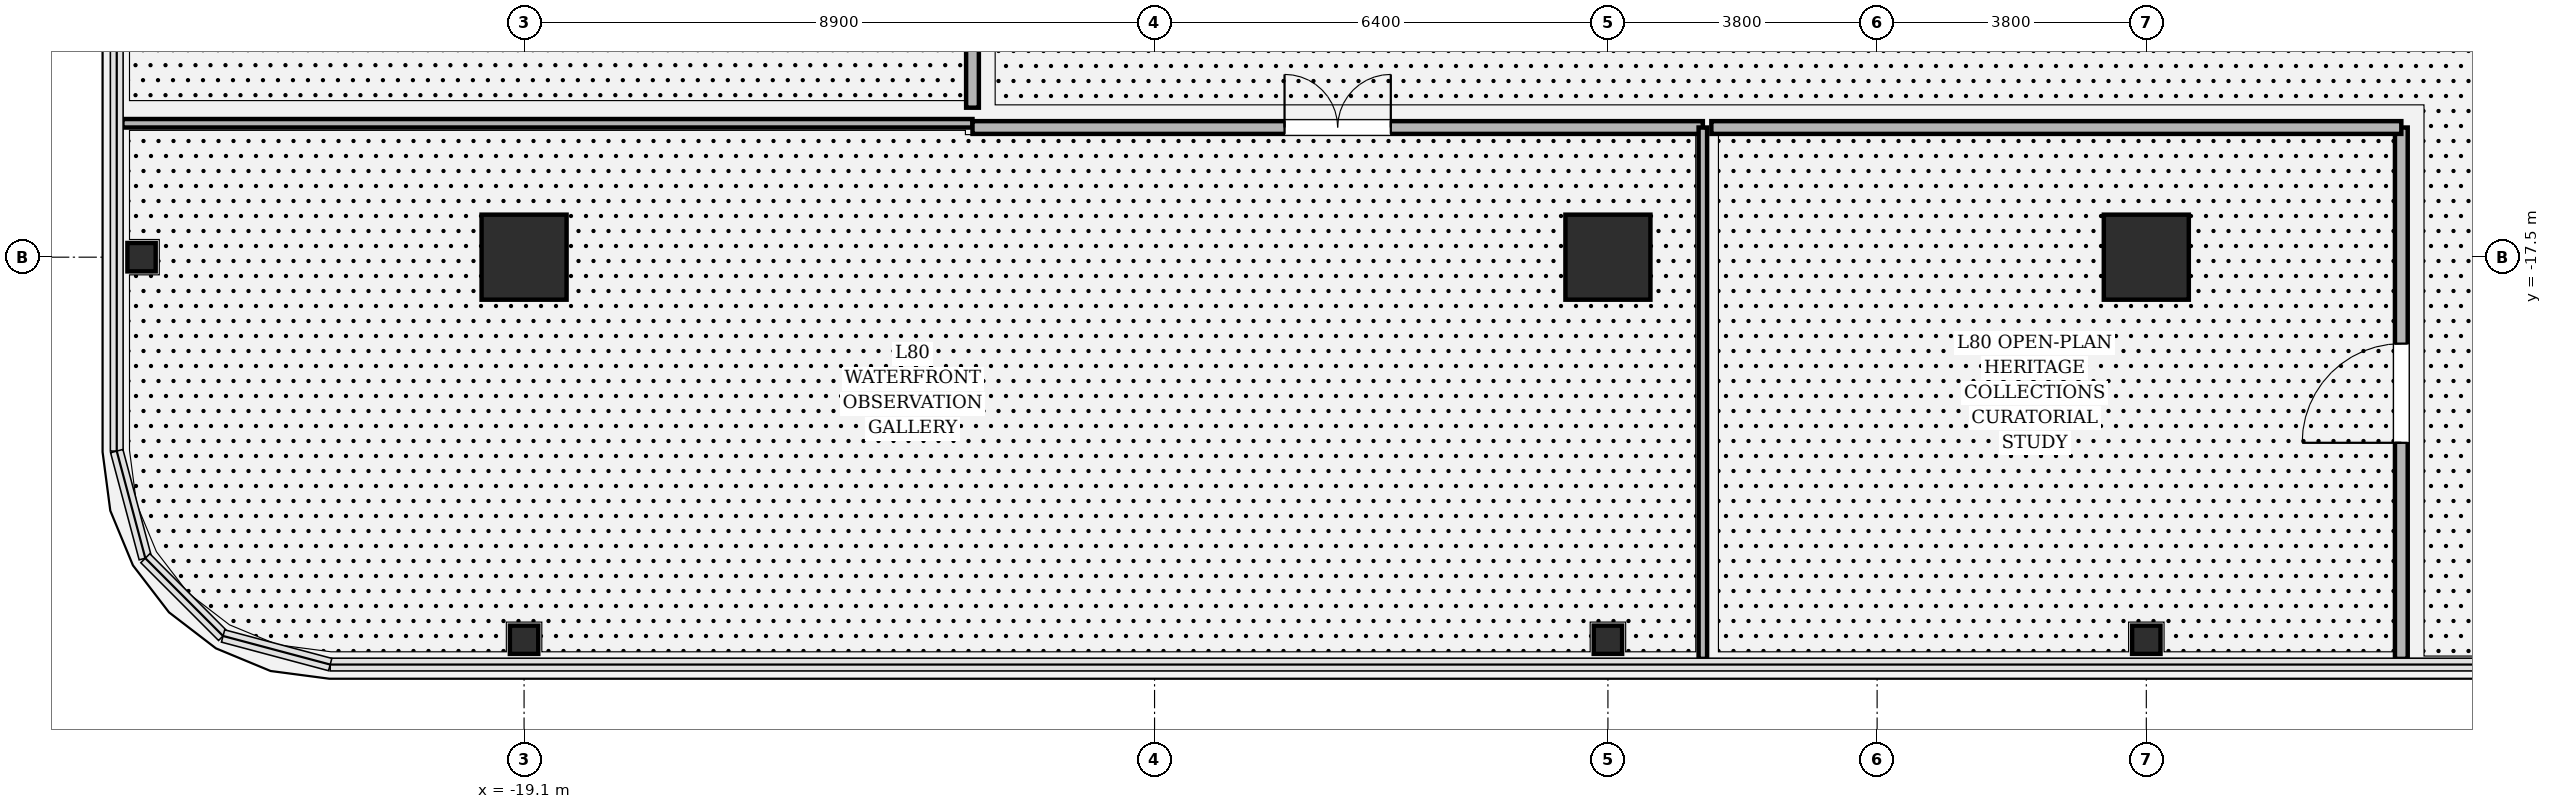
"""IFC4 building model, lengths in metres.
Left out: names, types, materials, properties, quantities, classifications, styles, units other than length and angle.
Written with IfcOpenShell. Run it as: python <this file> out.ifc"""

import sys

from ifc_helpers import new_model, si_unit, direction, frame, frame_2d, origin, origin_2d, place, context, subcontext, project, spatial, rectangle, hollow_rectangle, i_section, extrude, element, fill, save


model = new_model("IFC4")
c1 = context("Model", 3, precision=1e-05, world=origin(), true_north=direction((0.0, 1.0)))
c2 = subcontext(c1, "Body", "Model", "MODEL_VIEW")
j1 = project(units=[si_unit("LENGTHUNIT", "METRE"), si_unit("PLANEANGLEUNIT", "RADIAN")], contexts=[c1])
p1 = place(None, origin())
s1 = spatial("IfcSite", under=j1, at=p1, CompositionType="ELEMENT")
p2 = place(p1, origin())
s2 = spatial("IfcBuilding", under=s1, at=p2, CompositionType="ELEMENT")
p3 = place(p2, frame((0.0, 0.0, 339.0)))
s3 = spatial("IfcBuildingStorey", under=s2, at=p3, CompositionType="ELEMENT", Elevation=339.0)
for number, where, z_axis, x_axis in (
    (1, (-19.1, -17.5, 0.0), (0.0, 0.0, 1.0), (1.0, 0.0, 0.0)),
    (2, (-3.8, -17.5, 0.0), (0.0, 0.0, 1.0), (1.0, 0.0, 0.0)),
    (3, (3.8, -17.5, 0.0), (0.0, 0.0, 1.0), (1.0, 0.0, 0.0)),
):
    element("IfcColumn", number, at=place(p3, frame(where, z_axis=z_axis, x_axis=x_axis)), inside=s3, PredefinedType="COLUMN", context=c2, shape_type="SweptSolid", body=[
        extrude(hollow_rectangle(XDim=1.2, YDim=1.2, WallThickness=0.035, at=origin_2d()), origin(), (0.0, 0.0, 1.0), 4.8),
    ])
for number, where, z_axis, x_axis in (
    (4, (-19.1, -22.9, 0.0), (0.0, 0.0, 1.0), (1.0, 0.0, 0.0)),
    (5, (-3.8, -22.9, 0.0), (0.0, 0.0, 1.0), (1.0, 0.0, 0.0)),
    (6, (3.8, -22.9, 0.0), (0.0, 0.0, 1.0), (1.0, 0.0, 0.0)),
    (7, (-24.5, -17.5, 0.0), (0.0, 0.0, 1.0), (0.0, 1.0, 0.0)),
):
    element("IfcColumn", number, at=place(p3, frame(where, z_axis=z_axis, x_axis=x_axis)), inside=s3, PredefinedType="COLUMN", context=c2, shape_type="SweptSolid", body=[
        extrude(i_section(OverallWidth=0.401, OverallDepth=0.399, WebThickness=0.025, FlangeThickness=0.04, FilletRadius=0.018, at=origin_2d()), origin(), (0.0, 0.0, 1.0), 4.798),
    ])
p4 = place(p3, frame((-24.77, -15.61, 0.0), z_axis=(0.0, 0.0, 1.0), x_axis=(1.0, 0.0, 0.0)))
e8 = element("IfcWall", 8, at=p4, inside=s3, PredefinedType="PARTITIONING", context=c2, shape_type="SweptSolid", body=[
    extrude(rectangle(XDim=12.0, YDim=0.12, at=frame_2d((6.0, 0.0))), origin(), (0.0, 0.0, 1.0), 3.194),
])
p5 = place(p3, frame((-12.77, -15.67, 0.0), z_axis=(0.0, 0.0, 1.0), x_axis=(1.0, 0.0, 0.0)))
e9 = element("IfcWall", 9, at=p5, inside=s3, PredefinedType="PARTITIONING", context=c2, shape_type="SweptSolid", body=[
    extrude(rectangle(XDim=10.31, YDim=0.18, at=frame_2d((5.155, 0.0))), origin(), (0.0, 0.0, 1.0), 3.194),
])
p6 = place(p5, frame((4.405, 0.0, 0.0)))
e10 = element("IfcOpeningElement", 10, at=p6, cuts=e9, PredefinedType="OPENING", context=c2, shape_type="SweptSolid", body=[
    extrude(rectangle(XDim=1.5, YDim=2.3, at=frame_2d((0.75, 1.15))), frame((0.0, 0.1, 0.0), z_axis=(0.0, -1.0, 0.0), x_axis=(1.0, 0.0, 0.0)), (0.0, 0.0, 1.0), 0.2),
])
p7 = place(p3, frame((-2.46, -15.67, 0.0), z_axis=(0.0, 0.0, 1.0), x_axis=(0.0, -1.0, 0.0)))
e11 = element("IfcWall", 11, at=p7, inside=s3, PredefinedType="PARTITIONING", context=c2, shape_type="SweptSolid", body=[
    extrude(rectangle(XDim=7.5, YDim=0.12, at=frame_2d((3.75, 0.0))), origin(), (0.0, 0.0, 1.0), 3.194),
])
p8 = place(p3, frame((7.4, -15.67, 0.0), z_axis=(0.0, 0.0, 1.0), x_axis=(0.0, -1.0, 0.0)))
e12 = element("IfcWall", 12, at=p8, inside=s3, PredefinedType="PARTITIONING", context=c2, shape_type="SweptSolid", body=[
    extrude(rectangle(XDim=7.5, YDim=0.18, at=frame_2d((3.75, 0.0))), origin(), (0.0, 0.0, 1.0), 3.194),
])
p9 = place(p8, frame((3.05, 0.0, 0.0)))
e13 = element("IfcOpeningElement", 13, at=p9, cuts=e12, PredefinedType="OPENING", context=c2, shape_type="SweptSolid", body=[
    extrude(rectangle(XDim=1.4, YDim=2.25, at=frame_2d((0.7, 1.125))), frame((0.0, 0.1, 0.0), z_axis=(0.0, -1.0, 0.0), x_axis=(1.0, 0.0, 0.0)), (0.0, 0.0, 1.0), 0.2),
])
p10 = place(p3, frame((-2.34, -15.67, 0.0), z_axis=(0.0, 0.0, 1.0), x_axis=(1.0, 0.0, 0.0)))
e14 = element("IfcWall", 14, at=p10, inside=s3, PredefinedType="PARTITIONING", context=c2, shape_type="SweptSolid", body=[
    extrude(rectangle(XDim=9.74, YDim=0.18, at=frame_2d((4.87, 0.0))), origin(), (0.0, 0.0, 1.0), 3.194),
])
p11 = place(p3, frame((-12.77, -13.38, 0.0), z_axis=(0.0, 0.0, 1.0), x_axis=(0.0, -1.0, 0.0)))
e15 = element("IfcWall", 15, at=p11, inside=s3, PredefinedType="PARTITIONING", context=c2, shape_type="SweptSolid", body=[
    extrude(rectangle(XDim=2.01, YDim=0.18, at=frame_2d((1.005, 0.0))), origin(), (0.0, 0.0, 1.0), 4.52),
])
p12 = place(p6, origin())
e16 = element("IfcDoor", 16, at=p12, inside=s3, OperationType="DOUBLE_DOOR_SINGLE_SWING", PredefinedType="DOOR", context=c2, shape_type="SweptSolid", body=[
    extrude(rectangle(XDim=1.5, YDim=2.3, at=frame_2d((0.75, 1.15))), frame((0.0, 0.025, 0.0), z_axis=(0.0, -1.0, 0.0), x_axis=(1.0, 0.0, 0.0)), (0.0, 0.0, 1.0), 0.05),
])
fill(e10, e16)
p13 = place(p9, origin())
e17 = element("IfcDoor", 17, at=p13, inside=s3, OperationType="SINGLE_SWING_RIGHT", PredefinedType="DOOR", context=c2, shape_type="SweptSolid", body=[
    extrude(rectangle(XDim=1.4, YDim=2.25, at=frame_2d((0.7, 1.125))), frame((0.0, 0.025, 0.0), z_axis=(0.0, -1.0, 0.0), x_axis=(1.0, 0.0, 0.0)), (0.0, 0.0, 1.0), 0.05),
])
fill(e13, e17)
save(model, sys.argv[1])
